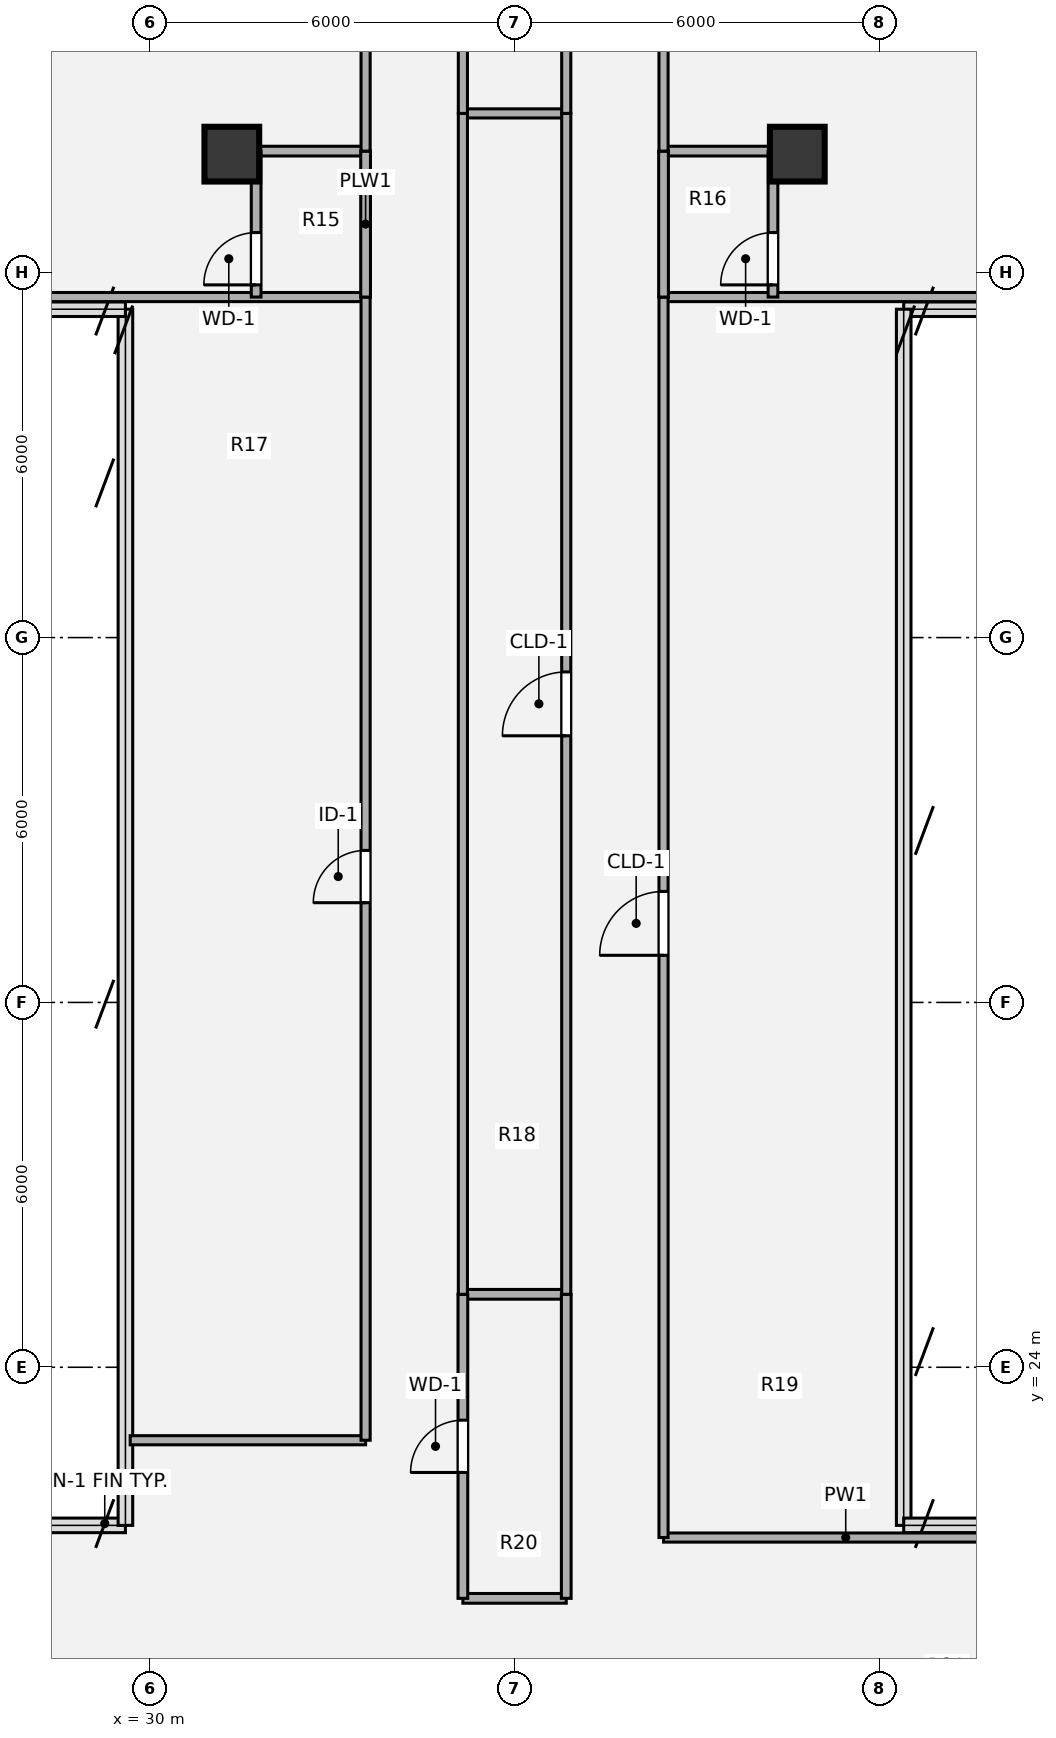
"""IFC4 building model, lengths in metres.
Left out: names, types, materials, properties, quantities, classifications, styles, units other than length and angle.
Written with IfcOpenShell. Run it as: python <this file> out.ifc"""

import sys

from ifc_helpers import new_model, si_unit, direction, frame, frame_2d, origin, origin_2d, place, context, subcontext, project, spatial, rectangle, hollow_circle, extrude, source, transform, mapped, element, fill, save


model = new_model("IFC4")
c1 = context("Model", 3, precision=1e-05, world=origin(), true_north=direction((0.0, 1.0)))
c2 = subcontext(c1, "Body", "Model", "MODEL_VIEW")
j1 = project(units=[si_unit("LENGTHUNIT", "METRE"), si_unit("PLANEANGLEUNIT", "RADIAN")], contexts=[c1])
p1 = place(None, origin())
s1 = spatial("IfcSite", under=j1, at=p1, CompositionType="ELEMENT")
p2 = place(p1, origin())
s2 = spatial("IfcBuilding", under=s1, at=p2, CompositionType="ELEMENT")
p3 = place(p2, frame((0.0, 0.0, 275.94)))
s3 = spatial("IfcBuildingStorey", under=s2, at=p3, CompositionType="ELEMENT", Elevation=275.94)
m1 = source(origin(), c2, "Body", "SweptSolid", [
    extrude(hollow_circle(Radius=0.45, WallThickness=0.032, at=origin_2d()), origin(), (0.0, 0.0, 1.0), 3.78),
])
for number, where, z_axis, x_axis in (
    (1, (31.35, 43.95, 0.0), (0.0, 0.0, 1.0), (1.0, 0.0, 0.0)),
    (2, (40.65, 43.95, 0.0), (0.0, 0.0, 1.0), (1.0, 0.0, 0.0)),
):
    element("IfcColumn", number, at=place(p3, frame(where, z_axis=z_axis, x_axis=x_axis)), inside=s3, PredefinedType="COLUMN", context=c2, shape_type="MappedRepresentation", body=[
        mapped(m1, transform((0.0, 0.0, 0.0), x_axis=(1.0, 0.0, 0.0), y_axis=(0.0, 1.0, 0.0), z_axis=(0.0, 0.0, 1.0), scale=1.0)),
    ])
p4 = place(p3, frame((35.15, 20.2, 0.0), z_axis=(0.0, 0.0, 1.0), x_axis=(1.0, 0.0, 0.0)))
e3 = element("IfcWall", 3, at=p4, inside=s3, PredefinedType="PLUMBINGWALL", context=c2, shape_type="SweptSolid", body=[
    extrude(rectangle(XDim=1.7, YDim=0.16, at=frame_2d((0.85, 0.0))), origin(), (0.0, 0.0, 1.0), 3.5),
])
p5 = place(p3, frame((38.45, 21.2, 0.0), z_axis=(0.0, 0.0, 1.0), x_axis=(1.0, 0.0, 0.0)))
e4 = element("IfcWall", 4, at=p5, inside=s3, PredefinedType="PARTITIONING", context=c2, shape_type="SweptSolid", body=[
    extrude(rectangle(XDim=5.993, YDim=0.15, at=frame_2d((2.997, 0.0))), origin(), (0.0, 0.0, 1.0), 3.5),
])
p6 = place(p3, frame((29.678, 22.8, 0.0), z_axis=(0.0, 0.0, 1.0), x_axis=(1.0, 0.0, 0.0)))
e5 = element("IfcWall", 5, at=p6, inside=s3, PredefinedType="PARTITIONING", context=c2, shape_type="SweptSolid", body=[
    extrude(rectangle(XDim=3.872, YDim=0.15, at=frame_2d((1.936, 0.0))), origin(), (0.0, 0.0, 1.0), 3.5),
])
p7 = place(p3, frame((35.15, 25.2, 0.0), z_axis=(0.0, 0.0, 1.0), x_axis=(1.0, 0.0, 0.0)))
e6 = element("IfcWall", 6, at=p7, inside=s3, PredefinedType="PLUMBINGWALL", context=c2, shape_type="SweptSolid", body=[
    extrude(rectangle(XDim=1.7, YDim=0.16, at=frame_2d((0.85, 0.0))), origin(), (0.0, 0.0, 1.0), 3.5),
])
p8 = place(p3, frame((27.558, 41.6, 0.0), z_axis=(0.0, 0.0, 1.0), x_axis=(1.0, 0.0, 0.0)))
e7 = element("IfcWall", 7, at=p8, inside=s3, PredefinedType="PARTITIONING", context=c2, shape_type="SweptSolid", body=[
    extrude(rectangle(XDim=5.992, YDim=0.15, at=frame_2d((2.996, 0.0))), origin(), (0.0, 0.0, 1.0), 3.5),
])
p9 = place(p3, frame((38.45, 41.6, 0.0), z_axis=(0.0, 0.0, 1.0), x_axis=(1.0, 0.0, 0.0)))
e8 = element("IfcWall", 8, at=p9, inside=s3, PredefinedType="PARTITIONING", context=c2, shape_type="SweptSolid", body=[
    extrude(rectangle(XDim=5.993, YDim=0.15, at=frame_2d((2.997, 0.0))), origin(), (0.0, 0.0, 1.0), 3.5),
])
for number, where, z_axis, x_axis in (
    (9, (31.75, 44.0, 0.0), (0.0, 0.0, 1.0), (1.0, 0.0, 0.0)),
    (10, (38.45, 44.0, 0.0), (0.0, 0.0, 1.0), (1.0, 0.0, 0.0)),
):
    element("IfcWall", number, at=place(p3, frame(where, z_axis=z_axis, x_axis=x_axis)), inside=s3, PredefinedType="PLUMBINGWALL", context=c2, shape_type="SweptSolid", body=[
        extrude(rectangle(XDim=1.8, YDim=0.16, at=frame_2d((0.9, 0.0))), origin(), (0.0, 0.0, 1.0), 2.903),
    ])
p10 = place(p3, frame((35.15, 44.62, 0.0), z_axis=(0.0, 0.0, 1.0), x_axis=(1.0, 0.0, 0.0)))
e11 = element("IfcWall", 11, at=p10, inside=s3, PredefinedType="PARTITIONING", context=c2, shape_type="SweptSolid", body=[
    extrude(rectangle(XDim=1.7, YDim=0.15, at=frame_2d((0.85, 0.0))), origin(), (0.0, 0.0, 1.0), 3.259),
])
p11 = place(p3, frame((31.75, 41.6, 0.0), z_axis=(0.0, 0.0, 1.0), x_axis=(0.0, 1.0, 0.0)))
e12 = element("IfcWall", 12, at=p11, inside=s3, PredefinedType="PLUMBINGWALL", context=c2, shape_type="SweptSolid", body=[
    extrude(rectangle(XDim=2.4, YDim=0.16, at=frame_2d((1.2, 0.0))), origin(), (0.0, 0.0, 1.0), 3.5),
])
p12 = place(p11, frame((0.2, 0.0, 0.0)))
e13 = element("IfcOpeningElement", 13, at=p12, cuts=e12, PredefinedType="OPENING", context=c2, shape_type="SweptSolid", body=[
    extrude(rectangle(XDim=0.86, YDim=2.1, at=origin_2d()), frame((0.43, 0.09, 1.05), z_axis=(0.0, -1.0, 0.0), x_axis=(1.0, 0.0, 0.0)), (0.0, 0.0, 1.0), 0.18),
])
p13 = place(p3, frame((33.55, 22.8, 0.0), z_axis=(0.0, 0.0, 1.0), x_axis=(0.0, 1.0, 0.0)))
e14 = element("IfcWall", 14, at=p13, inside=s3, PredefinedType="PARTITIONING", context=c2, shape_type="SweptSolid", body=[
    extrude(rectangle(XDim=18.8, YDim=0.15, at=frame_2d((9.4, 0.0))), origin(), (0.0, 0.0, 1.0), 3.5),
])
p14 = place(p13, frame((8.84, 0.0, 0.0)))
e15 = element("IfcOpeningElement", 15, at=p14, cuts=e14, PredefinedType="OPENING", context=c2, shape_type="SweptSolid", body=[
    extrude(rectangle(XDim=0.86, YDim=2.1, at=origin_2d()), frame((0.43, 0.085, 1.05), z_axis=(0.0, -1.0, 0.0), x_axis=(1.0, 0.0, 0.0)), (0.0, 0.0, 1.0), 0.17),
])
p15 = place(p3, frame((33.55, 41.6, 0.0), z_axis=(0.0, 0.0, 1.0), x_axis=(0.0, 1.0, 0.0)))
e16 = element("IfcWall", 16, at=p15, inside=s3, PredefinedType="PLUMBINGWALL", context=c2, shape_type="SweptSolid", body=[
    extrude(rectangle(XDim=2.4, YDim=0.16, at=frame_2d((1.2, 0.0))), origin(), (0.0, 0.0, 1.0), 3.5),
])
p16 = place(p3, frame((33.55, 44.0, 0.0), z_axis=(0.0, 0.0, 1.0), x_axis=(0.0, 1.0, 0.0)))
e17 = element("IfcWall", 17, at=p16, inside=s3, PredefinedType="PARTITIONING", context=c2, shape_type="SweptSolid", body=[
    extrude(rectangle(XDim=5.64, YDim=0.15, at=frame_2d((2.82, 0.0))), origin(), (0.0, 0.0, 1.0), 3.5),
])
p17 = place(p16, frame((2.36, 0.0, 0.0)))
e18 = element("IfcOpeningElement", 18, at=p17, cuts=e17, PredefinedType="OPENING", context=c2, shape_type="SweptSolid", body=[
    extrude(rectangle(XDim=0.92, YDim=2.1, at=origin_2d()), frame((0.46, 0.085, 1.05), z_axis=(0.0, -1.0, 0.0), x_axis=(1.0, 0.0, 0.0)), (0.0, 0.0, 1.0), 0.17),
])
p18 = place(p3, frame((35.15, 20.2, 0.0), z_axis=(0.0, 0.0, 1.0), x_axis=(0.0, 1.0, 0.0)))
e19 = element("IfcWall", 19, at=p18, inside=s3, PredefinedType="PLUMBINGWALL", context=c2, shape_type="SweptSolid", body=[
    extrude(rectangle(XDim=5.0, YDim=0.16, at=frame_2d((2.5, 0.0))), origin(), (0.0, 0.0, 1.0), 3.5),
])
p19 = place(p18, frame((2.07, 0.0, 0.0)))
e20 = element("IfcOpeningElement", 20, at=p19, cuts=e19, PredefinedType="OPENING", context=c2, shape_type="SweptSolid", body=[
    extrude(rectangle(XDim=0.86, YDim=2.1, at=origin_2d()), frame((0.43, 0.09, 1.05), z_axis=(0.0, -1.0, 0.0), x_axis=(1.0, 0.0, 0.0)), (0.0, 0.0, 1.0), 0.18),
])
p20 = place(p3, frame((35.15, 25.2, 0.0), z_axis=(0.0, 0.0, 1.0), x_axis=(0.0, 1.0, 0.0)))
e21 = element("IfcWall", 21, at=p20, inside=s3, PredefinedType="PARTITIONING", context=c2, shape_type="SweptSolid", body=[
    extrude(rectangle(XDim=19.42, YDim=0.15, at=frame_2d((9.71, 0.0))), origin(), (0.0, 0.0, 1.0), 3.5),
])
p21 = place(p3, frame((35.15, 44.62, 0.0), z_axis=(0.0, 0.0, 1.0), x_axis=(0.0, 1.0, 0.0)))
e22 = element("IfcWall", 22, at=p21, inside=s3, PredefinedType="PARTITIONING", context=c2, shape_type="SweptSolid", body=[
    extrude(rectangle(XDim=12.58, YDim=0.15, at=frame_2d((6.29, 0.0))), origin(), (0.0, 0.0, 1.0), 3.5),
])
p22 = place(p21, frame((5.83, 0.0, 0.0)))
e23 = element("IfcOpeningElement", 23, at=p22, cuts=e22, PredefinedType="OPENING", context=c2, shape_type="SweptSolid", body=[
    extrude(rectangle(XDim=0.86, YDim=2.1, at=origin_2d()), frame((0.43, 0.085, 1.05), z_axis=(0.0, -1.0, 0.0), x_axis=(1.0, 0.0, 0.0)), (0.0, 0.0, 1.0), 0.17),
])
p23 = place(p3, frame((36.85, 20.2, 0.0), z_axis=(0.0, 0.0, 1.0), x_axis=(0.0, 1.0, 0.0)))
e24 = element("IfcWall", 24, at=p23, inside=s3, PredefinedType="PLUMBINGWALL", context=c2, shape_type="SweptSolid", body=[
    extrude(rectangle(XDim=5.0, YDim=0.16, at=frame_2d((2.5, 0.0))), origin(), (0.0, 0.0, 1.0), 3.5),
])
p24 = place(p3, frame((36.85, 25.2, 0.0), z_axis=(0.0, 0.0, 1.0), x_axis=(0.0, 1.0, 0.0)))
e25 = element("IfcWall", 25, at=p24, inside=s3, PredefinedType="PARTITIONING", context=c2, shape_type="SweptSolid", body=[
    extrude(rectangle(XDim=19.42, YDim=0.15, at=frame_2d((9.71, 0.0))), origin(), (0.0, 0.0, 1.0), 3.5),
])
p25 = place(p24, frame((9.185, 0.0, 0.0)))
e26 = element("IfcOpeningElement", 26, at=p25, cuts=e25, PredefinedType="OPENING", context=c2, shape_type="SweptSolid", body=[
    extrude(rectangle(XDim=1.05, YDim=2.1, at=origin_2d()), frame((0.525, 0.085, 1.05), z_axis=(0.0, -1.0, 0.0), x_axis=(1.0, 0.0, 0.0)), (0.0, 0.0, 1.0), 0.17),
])
p26 = place(p3, frame((36.85, 44.62, 0.0), z_axis=(0.0, 0.0, 1.0), x_axis=(0.0, 1.0, 0.0)))
e27 = element("IfcWall", 27, at=p26, inside=s3, PredefinedType="PARTITIONING", context=c2, shape_type="SweptSolid", body=[
    extrude(rectangle(XDim=12.58, YDim=0.15, at=frame_2d((6.29, 0.0))), origin(), (0.0, 0.0, 1.0), 3.5),
])
p27 = place(p3, frame((38.45, 21.2, 0.0), z_axis=(0.0, 0.0, 1.0), x_axis=(0.0, 1.0, 0.0)))
e28 = element("IfcWall", 28, at=p27, inside=s3, PredefinedType="PARTITIONING", context=c2, shape_type="SweptSolid", body=[
    extrude(rectangle(XDim=20.4, YDim=0.15, at=frame_2d((10.2, 0.0))), origin(), (0.0, 0.0, 1.0), 3.5),
])
p28 = place(p27, frame((9.575, 0.0, 0.0)))
e29 = element("IfcOpeningElement", 29, at=p28, cuts=e28, PredefinedType="OPENING", context=c2, shape_type="SweptSolid", body=[
    extrude(rectangle(XDim=1.05, YDim=2.1, at=origin_2d()), frame((0.525, 0.085, 1.05), z_axis=(0.0, -1.0, 0.0), x_axis=(1.0, 0.0, 0.0)), (0.0, 0.0, 1.0), 0.17),
])
p29 = place(p3, frame((38.45, 41.6, 0.0), z_axis=(0.0, 0.0, 1.0), x_axis=(0.0, 1.0, 0.0)))
e30 = element("IfcWall", 30, at=p29, inside=s3, PredefinedType="PLUMBINGWALL", context=c2, shape_type="SweptSolid", body=[
    extrude(rectangle(XDim=2.4, YDim=0.16, at=frame_2d((1.2, 0.0))), origin(), (0.0, 0.0, 1.0), 3.5),
])
p30 = place(p3, frame((38.45, 44.0, 0.0), z_axis=(0.0, 0.0, 1.0), x_axis=(0.0, 1.0, 0.0)))
e31 = element("IfcWall", 31, at=p30, inside=s3, PredefinedType="PARTITIONING", context=c2, shape_type="SweptSolid", body=[
    extrude(rectangle(XDim=5.64, YDim=0.15, at=frame_2d((2.82, 0.0))), origin(), (0.0, 0.0, 1.0), 3.5),
])
p31 = place(p30, frame((2.36, 0.0, 0.0)))
e32 = element("IfcOpeningElement", 32, at=p31, cuts=e31, PredefinedType="OPENING", context=c2, shape_type="SweptSolid", body=[
    extrude(rectangle(XDim=0.92, YDim=2.1, at=origin_2d()), frame((0.46, 0.085, 1.05), z_axis=(0.0, -1.0, 0.0), x_axis=(1.0, 0.0, 0.0)), (0.0, 0.0, 1.0), 0.17),
])
p32 = place(p3, frame((40.25, 41.6, 0.0), z_axis=(0.0, 0.0, 1.0), x_axis=(0.0, 1.0, 0.0)))
e33 = element("IfcWall", 33, at=p32, inside=s3, PredefinedType="PLUMBINGWALL", context=c2, shape_type="SweptSolid", body=[
    extrude(rectangle(XDim=2.4, YDim=0.16, at=frame_2d((1.2, 0.0))), origin(), (0.0, 0.0, 1.0), 3.5),
])
p33 = place(p32, frame((0.2, 0.0, 0.0)))
e34 = element("IfcOpeningElement", 34, at=p33, cuts=e33, PredefinedType="OPENING", context=c2, shape_type="SweptSolid", body=[
    extrude(rectangle(XDim=0.86, YDim=2.1, at=origin_2d()), frame((0.43, 0.09, 1.05), z_axis=(0.0, -1.0, 0.0), x_axis=(1.0, 0.0, 0.0)), (0.0, 0.0, 1.0), 0.18),
])
m2 = source(origin(), c2, "Body", "SweptSolid", [
    extrude(rectangle(XDim=0.86, YDim=2.1, at=origin_2d()), frame((0.43, 0.025, 1.05), z_axis=(0.0, -1.0, 0.0), x_axis=(1.0, 0.0, 0.0)), (0.0, 0.0, 1.0), 0.05),
])
p34 = place(p12, origin())
e35 = element("IfcDoor", 35, at=p34, inside=s3, OperationType="SINGLE_SWING_LEFT", PredefinedType="DOOR", context=c2, shape_type="MappedRepresentation", body=[
    mapped(m2, transform((0.0, 0.0, 0.0), x_axis=(1.0, 0.0, 0.0), y_axis=(0.0, 1.0, 0.0), z_axis=(0.0, 0.0, 1.0), scale=1.0)),
])
fill(e13, e35)
m3 = source(origin(), c2, "Body", "SweptSolid", [
    extrude(rectangle(XDim=0.86, YDim=2.1, at=origin_2d()), frame((0.43, 0.025, 1.05), z_axis=(0.0, -1.0, 0.0), x_axis=(1.0, 0.0, 0.0)), (0.0, 0.0, 1.0), 0.05),
])
p35 = place(p14, origin())
e36 = element("IfcDoor", 36, at=p35, inside=s3, OperationType="SINGLE_SWING_LEFT", PredefinedType="DOOR", context=c2, shape_type="MappedRepresentation", body=[
    mapped(m3, transform((0.0, 0.0, 0.0), x_axis=(1.0, 0.0, 0.0), y_axis=(0.0, 1.0, 0.0), z_axis=(0.0, 0.0, 1.0), scale=1.0)),
])
fill(e15, e36)
p36 = place(p19, origin())
e37 = element("IfcDoor", 37, at=p36, inside=s3, OperationType="SINGLE_SWING_LEFT", PredefinedType="DOOR", context=c2, shape_type="MappedRepresentation", body=[
    mapped(m2, transform((0.0, 0.0, 0.0), x_axis=(1.0, 0.0, 0.0), y_axis=(0.0, 1.0, 0.0), z_axis=(0.0, 0.0, 1.0), scale=1.0)),
])
fill(e20, e37)
m4 = source(origin(), c2, "Body", "SweptSolid", [
    extrude(rectangle(XDim=1.05, YDim=2.1, at=origin_2d()), frame((0.525, 0.025, 1.05), z_axis=(0.0, -1.0, 0.0), x_axis=(1.0, 0.0, 0.0)), (0.0, 0.0, 1.0), 0.05),
])
p37 = place(p25, origin())
e38 = element("IfcDoor", 38, at=p37, inside=s3, OperationType="SINGLE_SWING_LEFT", PredefinedType="DOOR", context=c2, shape_type="MappedRepresentation", body=[
    mapped(m4, transform((0.0, 0.0, 0.0), x_axis=(1.0, 0.0, 0.0), y_axis=(0.0, 1.0, 0.0), z_axis=(0.0, 0.0, 1.0), scale=1.0)),
])
fill(e26, e38)
p38 = place(p28, origin())
e39 = element("IfcDoor", 39, at=p38, inside=s3, OperationType="SINGLE_SWING_LEFT", PredefinedType="DOOR", context=c2, shape_type="MappedRepresentation", body=[
    mapped(m4, transform((0.0, 0.0, 0.0), x_axis=(1.0, 0.0, 0.0), y_axis=(0.0, 1.0, 0.0), z_axis=(0.0, 0.0, 1.0), scale=1.0)),
])
fill(e29, e39)
p39 = place(p33, origin())
e40 = element("IfcDoor", 40, at=p39, inside=s3, OperationType="SINGLE_SWING_LEFT", PredefinedType="DOOR", context=c2, shape_type="MappedRepresentation", body=[
    mapped(m2, transform((0.0, 0.0, 0.0), x_axis=(1.0, 0.0, 0.0), y_axis=(0.0, 1.0, 0.0), z_axis=(0.0, 0.0, 1.0), scale=1.0)),
])
fill(e34, e40)
save(model, sys.argv[1])
